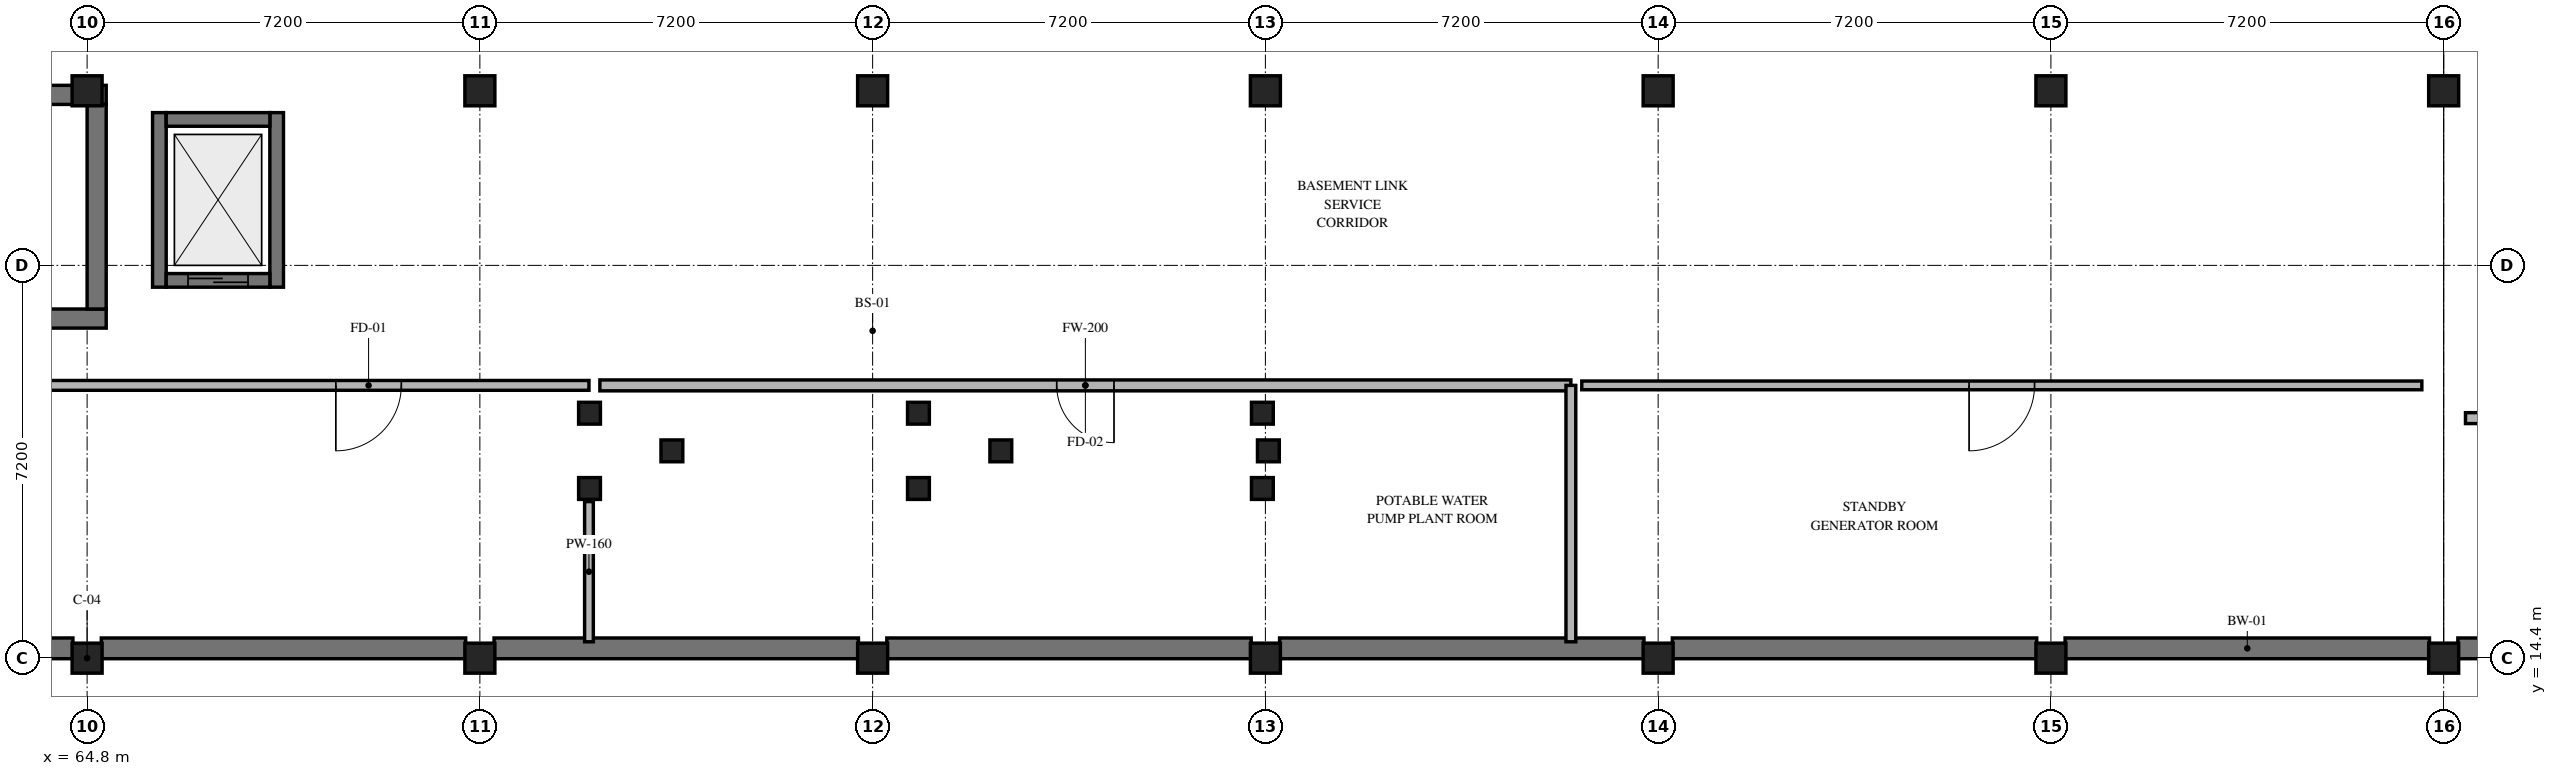
"""IFC4 building model, lengths in metres.
Left out: names, types, materials, properties, quantities, classifications, styles, units other than length and angle.
Written with IfcOpenShell. Run it as: python <this file> out.ifc"""

import sys

from ifc_helpers import new_model, si_unit, direction, frame, frame_2d, origin, origin_2d, place, context, subcontext, project, spatial, rectangle, extrude, element, fill, save


model = new_model("IFC4")
c1 = context("Model", 3, precision=1e-05, world=origin(), true_north=direction((0.0, 1.0)))
c2 = subcontext(c1, "Body", "Model", "MODEL_VIEW")
j1 = project(units=[si_unit("LENGTHUNIT", "METRE"), si_unit("PLANEANGLEUNIT", "RADIAN")], contexts=[c1])
p1 = place(None, origin())
s1 = spatial("IfcSite", under=j1, at=p1, CompositionType="ELEMENT")
p2 = place(p1, origin())
s2 = spatial("IfcBuilding", under=s1, at=p2, CompositionType="ELEMENT")
p3 = place(p2, frame((0.0, 0.0, -4.2)))
s3 = spatial("IfcBuildingStorey", under=s2, at=p3, CompositionType="ELEMENT", Elevation=-4.2)
for number, where, z_axis, x_axis in (
    (1, (64.8, 14.4, 0.0), (0.0, 0.0, 1.0), (1.0, 0.0, 0.0)),
    (2, (64.8, 24.8, 0.0), (0.0, 0.0, 1.0), (1.0, 0.0, 0.0)),
    (3, (72.0, 14.4, 0.0), (0.0, 0.0, 1.0), (1.0, 0.0, 0.0)),
    (4, (72.0, 24.8, 0.0), (0.0, 0.0, 1.0), (1.0, 0.0, 0.0)),
    (5, (79.2, 14.4, 0.0), (0.0, 0.0, 1.0), (1.0, 0.0, 0.0)),
    (6, (79.2, 24.8, 0.0), (0.0, 0.0, 1.0), (1.0, 0.0, 0.0)),
    (7, (86.4, 14.4, 0.0), (0.0, 0.0, 1.0), (1.0, 0.0, 0.0)),
    (8, (86.4, 24.8, 0.0), (0.0, 0.0, 1.0), (1.0, 0.0, 0.0)),
    (9, (93.6, 14.4, 0.0), (0.0, 0.0, 1.0), (1.0, 0.0, 0.0)),
    (10, (93.6, 24.8, 0.0), (0.0, 0.0, 1.0), (1.0, 0.0, 0.0)),
    (11, (100.8, 14.4, 0.0), (0.0, 0.0, 1.0), (1.0, 0.0, 0.0)),
    (12, (100.8, 24.8, 0.0), (0.0, 0.0, 1.0), (1.0, 0.0, 0.0)),
    (13, (108.0, 14.4, 0.0), (0.0, 0.0, 1.0), (1.0, 0.0, 0.0)),
    (14, (108.0, 24.8, 0.0), (0.0, 0.0, 1.0), (1.0, 0.0, 0.0)),
):
    element("IfcColumn", number, at=place(p3, frame(where, z_axis=z_axis, x_axis=x_axis)), inside=s3, PredefinedType="COLUMN", context=c2, shape_type="SweptSolid", body=[
        extrude(rectangle(XDim=0.55, YDim=0.55, at=origin_2d()), origin(), (0.0, 0.0, 1.0), 4.2),
    ])
for number, where, z_axis, x_axis in (
    (15, (107.74, 14.58, 0.0), (0.0, 0.0, 1.0), (-1.0, 0.0, 0.0)),
    (16, (100.54, 14.58, 0.0), (0.0, 0.0, 1.0), (-1.0, 0.0, 0.0)),
):
    element("IfcWall", number, at=place(p3, frame(where, z_axis=z_axis, x_axis=x_axis)), inside=s3, PredefinedType="SOLIDWALL", context=c2, shape_type="SweptSolid", body=[
        extrude(rectangle(XDim=6.68, YDim=0.38, at=frame_2d((3.34, 0.0))), origin(), (0.0, 0.0, 1.0), 3.92),
    ])
p4 = place(p3, frame((93.34, 14.58, 0.0), z_axis=(0.0, 0.0, 1.0), x_axis=(-1.0, 0.0, 0.0)))
e17 = element("IfcWall", 17, at=p4, inside=s3, PredefinedType="SOLIDWALL", context=c2, shape_type="SweptSolid", body=[
    extrude(rectangle(XDim=6.68, YDim=0.38, at=frame_2d((3.34, 0.0))), origin(), (0.0, 0.0, 1.0), 3.92),
])
for number, where, z_axis, x_axis in (
    (18, (86.14, 14.58, 0.0), (0.0, 0.0, 1.0), (-1.0, 0.0, 0.0)),
    (19, (78.94, 14.58, 0.0), (0.0, 0.0, 1.0), (-1.0, 0.0, 0.0)),
    (20, (71.74, 14.58, 0.0), (0.0, 0.0, 1.0), (-1.0, 0.0, 0.0)),
    (21, (64.54, 14.58, 0.0), (0.0, 0.0, 1.0), (-1.0, 0.0, 0.0)),
):
    element("IfcWall", number, at=place(p3, frame(where, z_axis=z_axis, x_axis=x_axis)), inside=s3, PredefinedType="SOLIDWALL", context=c2, shape_type="SweptSolid", body=[
        extrude(rectangle(XDim=6.68, YDim=0.38, at=frame_2d((3.34, 0.0))), origin(), (0.0, 0.0, 1.0), 3.92),
    ])
p5 = place(p3, frame((114.89, 14.58, 0.0), z_axis=(0.0, 0.0, 1.0), x_axis=(-1.0, 0.0, 0.0)))
e22 = element("IfcWall", 22, at=p5, inside=s3, PredefinedType="SOLIDWALL", context=c2, shape_type="SweptSolid", body=[
    extrude(rectangle(XDim=6.63, YDim=0.38, at=frame_2d((3.315, 0.0))), origin(), (0.0, 0.0, 1.0), 3.92),
])
for number, where, z_axis, x_axis in (
    (23, (56.05, 20.625, 0.0), (0.0, 0.0, 1.0), (1.0, 0.0, 0.0)),
    (24, (65.15, 24.725, 0.0), (0.0, 0.0, 1.0), (-1.0, 0.0, 0.0)),
):
    element("IfcWall", number, at=place(p3, frame(where, z_axis=z_axis, x_axis=x_axis)), inside=s3, PredefinedType="SHEAR", context=c2, shape_type="SweptSolid", body=[
        extrude(rectangle(XDim=9.1, YDim=0.35, at=frame_2d((4.55, 0.0))), origin(), (0.0, 0.0, 1.0), 3.92),
    ])
p6 = place(p3, frame((64.975, 20.8, 0.0), z_axis=(0.0, 0.0, 1.0), x_axis=(0.0, 1.0, 0.0)))
e25 = element("IfcWall", 25, at=p6, inside=s3, PredefinedType="SHEAR", context=c2, shape_type="SweptSolid", body=[
    extrude(rectangle(XDim=3.75, YDim=0.35, at=frame_2d((1.875, 0.0))), origin(), (0.0, 0.0, 1.0), 3.92),
])
for number, where, z_axis, x_axis in (
    (26, (74.01, 17.51, 0.0), (0.0, 0.0, 1.0), (1.0, 0.0, 0.0)),
    (27, (74.01, 18.89, 0.0), (0.0, 0.0, 1.0), (1.0, 0.0, 0.0)),
    (28, (75.52, 18.2, 0.0), (0.0, 0.0, 1.0), (1.0, 0.0, 0.0)),
    (29, (80.04, 17.51, 0.0), (0.0, 0.0, 1.0), (1.0, 0.0, 0.0)),
    (30, (80.04, 18.89, 0.0), (0.0, 0.0, 1.0), (1.0, 0.0, 0.0)),
    (31, (81.55, 18.2, 0.0), (0.0, 0.0, 1.0), (1.0, 0.0, 0.0)),
    (32, (86.345, 17.51, 0.0), (0.0, 0.0, 1.0), (1.0, 0.0, 0.0)),
    (33, (86.345, 18.89, 0.0), (0.0, 0.0, 1.0), (1.0, 0.0, 0.0)),
    (34, (86.455, 18.2, 0.0), (0.0, 0.0, 1.0), (1.0, 0.0, 0.0)),
):
    element("IfcColumn", number, at=place(p3, frame(where, z_axis=z_axis, x_axis=x_axis)), inside=s3, PredefinedType="COLUMN", context=c2, shape_type="SweptSolid", body=[
        extrude(rectangle(XDim=0.4, YDim=0.4, at=origin_2d()), origin(), (0.0, 0.0, 1.0), 4.2),
    ])
for number, where, z_axis, x_axis in (
    (35, (66.125, 21.2, 0.0), (0.0, 0.0, 1.0), (0.0, 1.0, 0.0)),
    (36, (68.275, 24.4, 0.0), (0.0, 0.0, 1.0), (0.0, -1.0, 0.0)),
):
    element("IfcWall", number, at=place(p3, frame(where, z_axis=z_axis, x_axis=x_axis)), inside=s3, PredefinedType="SOLIDWALL", context=c2, shape_type="SweptSolid", body=[
        extrude(rectangle(XDim=3.2, YDim=0.25, at=frame_2d((1.6, 0.0))), origin(), (0.0, 0.0, 1.0), 3.92),
    ])
p7 = place(p3, frame((66.25, 21.325, 0.0), z_axis=(0.0, 0.0, 1.0), x_axis=(1.0, 0.0, 0.0)))
e37 = element("IfcWall", 37, at=p7, inside=s3, PredefinedType="SOLIDWALL", context=c2, shape_type="SweptSolid", body=[
    extrude(rectangle(XDim=1.9, YDim=0.25, at=frame_2d((0.95, 0.0))), origin(), (0.0, 0.0, 1.0), 3.92),
])
p8 = place(p7, frame((0.4, 0.0, 0.0)))
e38 = element("IfcOpeningElement", 38, at=p8, cuts=e37, PredefinedType="OPENING", context=c2, shape_type="SweptSolid", body=[
    extrude(rectangle(XDim=1.1, YDim=2.2, at=frame_2d((0.55, 1.1))), frame((0.0, 0.135, 0.0), z_axis=(0.0, -1.0, 0.0), x_axis=(1.0, 0.0, 0.0)), (0.0, 0.0, 1.0), 0.27),
])
p9 = place(p3, frame((68.15, 24.275, 0.0), z_axis=(0.0, 0.0, 1.0), x_axis=(-1.0, 0.0, 0.0)))
e39 = element("IfcWall", 39, at=p9, inside=s3, PredefinedType="SOLIDWALL", context=c2, shape_type="SweptSolid", body=[
    extrude(rectangle(XDim=1.9, YDim=0.25, at=frame_2d((0.95, 0.0))), origin(), (0.0, 0.0, 1.0), 3.92),
])
p10 = place(p3, frame((74.0, 19.4, 0.0), z_axis=(0.0, 0.0, 1.0), x_axis=(-1.0, 0.0, 0.0)))
e40 = element("IfcWall", 40, at=p10, inside=s3, PredefinedType="PARTITIONING", context=c2, shape_type="SweptSolid", body=[
    extrude(rectangle(XDim=23.2, YDim=0.18, at=frame_2d((11.6, 0.0))), origin(), (0.0, 0.0, 1.0), 3.02),
])
p11 = place(p10, frame((3.44, 0.0, 0.0)))
e41 = element("IfcOpeningElement", 41, at=p11, cuts=e40, PredefinedType="OPENING", context=c2, shape_type="SweptSolid", body=[
    extrude(rectangle(XDim=1.2, YDim=2.2, at=frame_2d((0.6, 1.1))), frame((0.0, 0.1, 0.0), z_axis=(0.0, -1.0, 0.0), x_axis=(1.0, 0.0, 0.0)), (0.0, 0.0, 1.0), 0.2),
])
p12 = place(p3, frame((74.0, 14.7, 0.0), z_axis=(0.0, 0.0, 1.0), x_axis=(0.0, 1.0, 0.0)))
e42 = element("IfcWall", 42, at=p12, inside=s3, PredefinedType="PARTITIONING", context=c2, shape_type="SweptSolid", body=[
    extrude(rectangle(XDim=2.57, YDim=0.16, at=frame_2d((1.285, 0.0))), origin(), (0.0, 0.0, 1.0), 3.44),
])
p13 = place(p3, frame((92.0, 19.4, 0.0), z_axis=(0.0, 0.0, 1.0), x_axis=(-1.0, 0.0, 0.0)))
e43 = element("IfcWall", 43, at=p13, inside=s3, PredefinedType="PARTITIONING", context=c2, shape_type="SweptSolid", body=[
    extrude(rectangle(XDim=17.8, YDim=0.2, at=frame_2d((8.9, 0.0))), origin(), (0.0, 0.0, 1.0), 3.02),
])
p14 = place(p13, frame((8.375, 0.0, 0.0)))
e44 = element("IfcOpeningElement", 44, at=p14, cuts=e43, PredefinedType="OPENING", context=c2, shape_type="SweptSolid", body=[
    extrude(rectangle(XDim=1.05, YDim=2.15, at=frame_2d((0.525, 1.075))), frame((0.0, 0.11, 0.0), z_axis=(0.0, -1.0, 0.0), x_axis=(1.0, 0.0, 0.0)), (0.0, 0.0, 1.0), 0.22),
])
p15 = place(p3, frame((92.0, 14.7, 0.0), z_axis=(0.0, 0.0, 1.0), x_axis=(0.0, 1.0, 0.0)))
e45 = element("IfcWall", 45, at=p15, inside=s3, PredefinedType="PARTITIONING", context=c2, shape_type="SweptSolid", body=[
    extrude(rectangle(XDim=4.7, YDim=0.18, at=frame_2d((2.35, 0.0))), origin(), (0.0, 0.0, 1.0), 3.02),
])
p16 = place(p3, frame((107.6, 19.4, 0.0), z_axis=(0.0, 0.0, 1.0), x_axis=(-1.0, 0.0, 0.0)))
e46 = element("IfcWall", 46, at=p16, inside=s3, PredefinedType="PARTITIONING", context=c2, shape_type="SweptSolid", body=[
    extrude(rectangle(XDim=15.4, YDim=0.16, at=frame_2d((7.7, 0.0))), origin(), (0.0, 0.0, 1.0), 3.02),
])
p17 = place(p16, frame((7.1, 0.0, 0.0)))
e47 = element("IfcOpeningElement", 47, at=p17, cuts=e46, PredefinedType="OPENING", context=c2, shape_type="SweptSolid", body=[
    extrude(rectangle(XDim=1.2, YDim=2.2, at=frame_2d((0.6, 1.1))), frame((0.0, 0.09, 0.0), z_axis=(0.0, -1.0, 0.0), x_axis=(1.0, 0.0, 0.0)), (0.0, 0.0, 1.0), 0.18),
])
p18 = place(p3, frame((108.4, 18.8, 0.0), z_axis=(0.0, 0.0, 1.0), x_axis=(1.0, 0.0, 0.0)))
e48 = element("IfcWall", 48, at=p18, inside=s3, PredefinedType="PARTITIONING", context=c2, shape_type="SweptSolid", body=[
    extrude(rectangle(XDim=7.45, YDim=0.2, at=frame_2d((3.725, 0.0))), origin(), (0.0, 0.0, 1.0), 3.12),
])
p19 = place(p18, frame((3.775, 0.0, 0.0)))
e49 = element("IfcOpeningElement", 49, at=p19, cuts=e48, PredefinedType="OPENING", context=c2, shape_type="SweptSolid", body=[
    extrude(rectangle(XDim=1.05, YDim=2.15, at=frame_2d((0.525, 1.075))), frame((0.0, 0.11, 0.0), z_axis=(0.0, -1.0, 0.0), x_axis=(1.0, 0.0, 0.0)), (0.0, 0.0, 1.0), 0.22),
])
p20 = place(p8, origin())
e50 = element("IfcDoor", 50, at=p20, inside=s3, OperationType="DOUBLE_DOOR_SLIDING", PredefinedType="DOOR", context=c2, shape_type="SweptSolid", body=[
    extrude(rectangle(XDim=1.1, YDim=2.2, at=frame_2d((0.55, 1.1))), frame((0.0, 0.025, 0.0), z_axis=(0.0, -1.0, 0.0), x_axis=(1.0, 0.0, 0.0)), (0.0, 0.0, 1.0), 0.05),
])
fill(e38, e50)
p21 = place(p11, origin())
e51 = element("IfcDoor", 51, at=p21, inside=s3, OperationType="SINGLE_SWING_RIGHT", PredefinedType="DOOR", context=c2, shape_type="SweptSolid", body=[
    extrude(rectangle(XDim=1.2, YDim=2.2, at=frame_2d((0.6, 1.1))), frame((0.0, 0.025, 0.0), z_axis=(0.0, -1.0, 0.0), x_axis=(1.0, 0.0, 0.0)), (0.0, 0.0, 1.0), 0.05),
])
fill(e41, e51)
p22 = place(p14, origin())
e52 = element("IfcDoor", 52, at=p22, inside=s3, OperationType="SINGLE_SWING_LEFT", PredefinedType="DOOR", context=c2, shape_type="SweptSolid", body=[
    extrude(rectangle(XDim=1.05, YDim=2.15, at=frame_2d((0.525, 1.075))), frame((0.0, 0.025, 0.0), z_axis=(0.0, -1.0, 0.0), x_axis=(1.0, 0.0, 0.0)), (0.0, 0.0, 1.0), 0.05),
])
fill(e44, e52)
p23 = place(p17, origin())
e53 = element("IfcDoor", 53, at=p23, inside=s3, OperationType="SINGLE_SWING_RIGHT", PredefinedType="DOOR", context=c2, shape_type="SweptSolid", body=[
    extrude(rectangle(XDim=1.2, YDim=2.2, at=frame_2d((0.6, 1.1))), frame((0.0, 0.025, 0.0), z_axis=(0.0, -1.0, 0.0), x_axis=(1.0, 0.0, 0.0)), (0.0, 0.0, 1.0), 0.05),
])
fill(e47, e53)
save(model, sys.argv[1])
